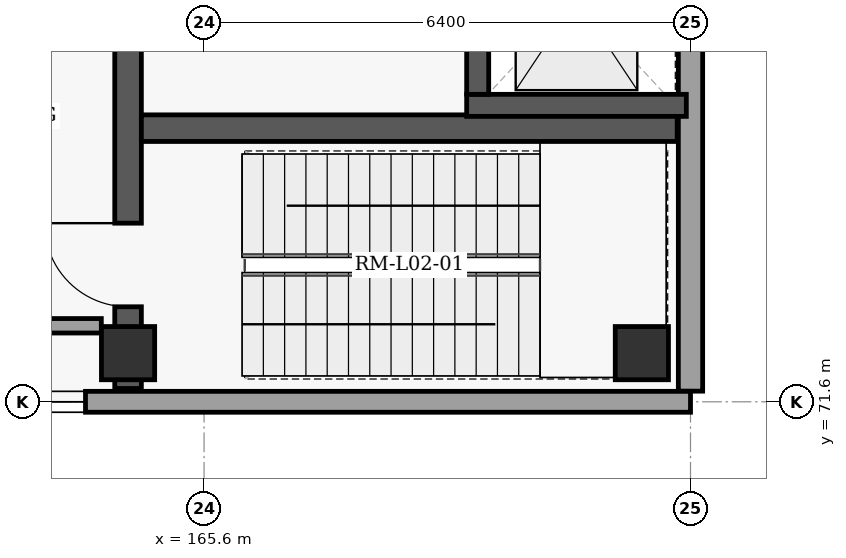
"""IFC4 building model, lengths in metres.
Left out: names, types, materials, properties, quantities, classifications, styles, units other than length and angle.
Written with IfcOpenShell. Run it as: python <this file> out.ifc"""

import sys

from ifc_helpers import new_model, si_unit, direction, frame, frame_2d, origin, origin_2d, place, context, subcontext, project, spatial, rectangle, extrude, element, fill, save


model = new_model("IFC4")
c1 = context("Model", 3, precision=1e-05, world=origin(), true_north=direction((0.0, 1.0)))
c2 = subcontext(c1, "Body", "Model", "MODEL_VIEW")
j1 = project(units=[si_unit("LENGTHUNIT", "METRE"), si_unit("PLANEANGLEUNIT", "RADIAN")], contexts=[c1])
p1 = place(None, origin())
s1 = spatial("IfcSite", under=j1, at=p1, CompositionType="ELEMENT")
p2 = place(p1, origin())
s2 = spatial("IfcBuilding", under=s1, at=p2, CompositionType="ELEMENT")
p3 = place(p2, frame((0.0, 0.0, 10.2)))
s3 = spatial("IfcBuildingStorey", under=s2, at=p3, CompositionType="ELEMENT", Elevation=10.2)
for number, where, z_axis, x_axis in (
    (1, (164.6, 72.24, 0.0), (0.0, 0.0, 1.0), (1.0, 0.0, 0.0)),
    (2, (171.36, 72.24, 0.0), (0.0, 0.0, 1.0), (1.0, 0.0, 0.0)),
):
    element("IfcColumn", number, at=place(p3, frame(where, z_axis=z_axis, x_axis=x_axis)), inside=s3, PredefinedType="COLUMN", context=c2, shape_type="SweptSolid", body=[
        extrude(rectangle(XDim=0.7, YDim=0.7, at=origin_2d()), origin(), (0.0, 0.0, 1.0), 5.4),
    ])
p4 = place(p3, frame((172.0, 117.86, 0.0), z_axis=(0.0, 0.0, 1.0), x_axis=(0.0, -1.0, 0.0)))
e3 = element("IfcWall", 3, at=p4, inside=s3, PredefinedType="SOLIDWALL", context=c2, shape_type="SweptSolid", body=[
    extrude(rectangle(XDim=46.12, YDim=0.32, at=frame_2d((23.06, 0.0))), origin(), (0.0, 0.0, 1.0), 5.16),
])
p5 = place(p3, frame((172.0, 71.6, 0.0), z_axis=(0.0, 0.0, 1.0), x_axis=(-1.0, 0.0, 0.0)))
e4 = element("IfcWall", 4, at=p5, inside=s3, PredefinedType="SOLIDWALL", context=c2, shape_type="SweptSolid", body=[
    extrude(rectangle(XDim=32.4, YDim=0.275, at=frame_2d((16.2, 0.0))), origin(), (0.0, 0.0, 1.0), 5.16),
])
p6 = place(p5, frame((7.96, 0.0, 0.8)))
e5 = element("IfcOpeningElement", 5, at=p6, cuts=e4, PredefinedType="OPENING", context=c2, shape_type="SweptSolid", body=[
    extrude(rectangle(XDim=2.2, YDim=2.25, at=frame_2d((1.1, 1.125))), frame((0.0, 0.147, 0.0), z_axis=(0.0, -1.0, 0.0), x_axis=(1.0, 0.0, 0.0)), (0.0, 0.0, 1.0), 0.295),
])
p7 = place(p5, frame((13.72, 0.0, 0.8)))
e6 = element("IfcOpeningElement", 6, at=p7, cuts=e4, PredefinedType="OPENING", context=c2, shape_type="SweptSolid", body=[
    extrude(rectangle(XDim=2.3, YDim=2.25, at=frame_2d((1.15, 1.125))), frame((0.0, 0.147, 0.0), z_axis=(0.0, -1.0, 0.0), x_axis=(1.0, 0.0, 0.0)), (0.0, 0.0, 1.0), 0.295),
])
p8 = place(p5, frame((20.93, 0.0, 0.8)))
e7 = element("IfcOpeningElement", 7, at=p8, cuts=e4, PredefinedType="OPENING", context=c2, shape_type="SweptSolid", body=[
    extrude(rectangle(XDim=2.4, YDim=2.3, at=frame_2d((1.2, 1.15))), frame((0.0, 0.147, 0.0), z_axis=(0.0, -1.0, 0.0), x_axis=(1.0, 0.0, 0.0)), (0.0, 0.0, 1.0), 0.295),
])
p9 = place(p5, frame((25.24, 0.0, 0.8)))
e8 = element("IfcOpeningElement", 8, at=p9, cuts=e4, PredefinedType="OPENING", context=c2, shape_type="SweptSolid", body=[
    extrude(rectangle(XDim=2.5, YDim=2.3, at=frame_2d((1.25, 1.15))), frame((0.0, 0.147, 0.0), z_axis=(0.0, -1.0, 0.0), x_axis=(1.0, 0.0, 0.0)), (0.0, 0.0, 1.0), 0.295),
])
p10 = place(p5, frame((17.18, 0.0, 0.0)))
e9 = element("IfcOpeningElement", 9, at=p10, cuts=e4, PredefinedType="OPENING", context=c2, shape_type="SweptSolid", body=[
    extrude(rectangle(XDim=1.4, YDim=2.25, at=frame_2d((0.7, 1.125))), frame((0.0, 0.147, 0.0), z_axis=(0.0, -1.0, 0.0), x_axis=(1.0, 0.0, 0.0)), (0.0, 0.0, 1.0), 0.295),
])
p11 = place(p3, frame((164.6, 71.775, 0.0), z_axis=(0.0, 0.0, 1.0), x_axis=(0.0, 1.0, 0.0)))
e10 = element("IfcWall", 10, at=p11, inside=s3, PredefinedType="SHEAR", context=c2, shape_type="SweptSolid", body=[
    extrude(rectangle(XDim=7.473, YDim=0.35, at=frame_2d((3.737, 0.0))), origin(), (0.0, 0.0, 1.0), 5.16),
])
p12 = place(p11, frame((1.075, 0.0, 0.0)))
e11 = element("IfcOpeningElement", 11, at=p12, cuts=e10, PredefinedType="OPENING", context=c2, shape_type="SweptSolid", body=[
    extrude(rectangle(XDim=1.1, YDim=2.15, at=frame_2d((0.55, 1.075))), frame((0.0, 0.185, 0.0), z_axis=(0.0, -1.0, 0.0), x_axis=(1.0, 0.0, 0.0)), (0.0, 0.0, 1.0), 0.37),
])
p13 = place(p11, frame((5.05, 0.0, 0.0)))
e12 = element("IfcOpeningElement", 12, at=p13, cuts=e10, PredefinedType="OPENING", context=c2, shape_type="SweptSolid", body=[
    extrude(rectangle(XDim=1.15, YDim=2.2, at=frame_2d((0.575, 1.1))), frame((0.0, 0.185, 0.0), z_axis=(0.0, -1.0, 0.0), x_axis=(1.0, 0.0, 0.0)), (0.0, 0.0, 1.0), 0.37),
])
p14 = place(p3, frame((164.775, 75.2, 0.0), z_axis=(0.0, 0.0, 1.0), x_axis=(1.0, 0.0, 0.0)))
e13 = element("IfcWall", 13, at=p14, inside=s3, PredefinedType="SHEAR", context=c2, shape_type="SweptSolid", body=[
    extrude(rectangle(XDim=7.05, YDim=0.35, at=frame_2d((3.525, 0.0))), origin(), (0.0, 0.0, 1.0), 5.16),
])
p15 = place(p3, frame((169.055, 75.5, 0.0), z_axis=(0.0, 0.0, 1.0), x_axis=(1.0, 0.0, 0.0)))
e14 = element("IfcWall", 14, at=p15, inside=s3, PredefinedType="SHEAR", context=c2, shape_type="SweptSolid", body=[
    extrude(rectangle(XDim=2.89, YDim=0.29, at=frame_2d((1.445, 0.0))), origin(), (0.0, 0.0, 1.0), 5.16),
])
p16 = place(p3, frame((169.2, 75.645, 0.0), z_axis=(0.0, 0.0, 1.0), x_axis=(0.0, 1.0, 0.0)))
e15 = element("IfcWall", 15, at=p16, inside=s3, PredefinedType="SHEAR", context=c2, shape_type="SweptSolid", body=[
    extrude(rectangle(XDim=2.51, YDim=0.29, at=frame_2d((1.255, 0.0))), origin(), (0.0, 0.0, 1.0), 5.16),
])
p17 = place(p16, frame((0.705, 0.0, 0.0)))
e16 = element("IfcOpeningElement", 16, at=p17, cuts=e15, PredefinedType="OPENING", context=c2, shape_type="SweptSolid", body=[
    extrude(rectangle(XDim=1.1, YDim=2.15, at=frame_2d((0.55, 1.075))), frame((0.0, 0.155, 0.0), z_axis=(0.0, -1.0, 0.0), x_axis=(1.0, 0.0, 0.0)), (0.0, 0.0, 1.0), 0.31),
])
p18 = place(p3, frame((160.105, 72.6, 0.0), z_axis=(0.0, 0.0, 1.0), x_axis=(1.0, 0.0, 0.0)))
e17 = element("IfcWall", 17, at=p18, inside=s3, PredefinedType="PARTITIONING", context=c2, shape_type="SweptSolid", body=[
    extrude(rectangle(XDim=4.143, YDim=0.19, at=frame_2d((2.072, 0.0))), origin(), (0.0, 0.0, 1.0), 4.51),
])
p19 = place(p6, origin())
e18 = element("IfcWindow", 18, at=p19, inside=s3, PartitioningType="SINGLE_PANEL", PredefinedType="WINDOW", context=c2, shape_type="SweptSolid", body=[
    extrude(rectangle(XDim=2.2, YDim=2.25, at=frame_2d((1.1, 1.125))), frame((0.0, 0.03, 0.0), z_axis=(0.0, -1.0, 0.0), x_axis=(1.0, 0.0, 0.0)), (0.0, 0.0, 1.0), 0.06),
])
fill(e5, e18)
p20 = place(p12, origin())
e19 = element("IfcDoor", 19, at=p20, inside=s3, OperationType="SINGLE_SWING_RIGHT", PredefinedType="DOOR", context=c2, shape_type="SweptSolid", body=[
    extrude(rectangle(XDim=1.1, YDim=2.15, at=frame_2d((0.55, 1.075))), frame((0.0, 0.025, 0.0), z_axis=(0.0, -1.0, 0.0), x_axis=(1.0, 0.0, 0.0)), (0.0, 0.0, 1.0), 0.05),
])
fill(e11, e19)
save(model, sys.argv[1])
